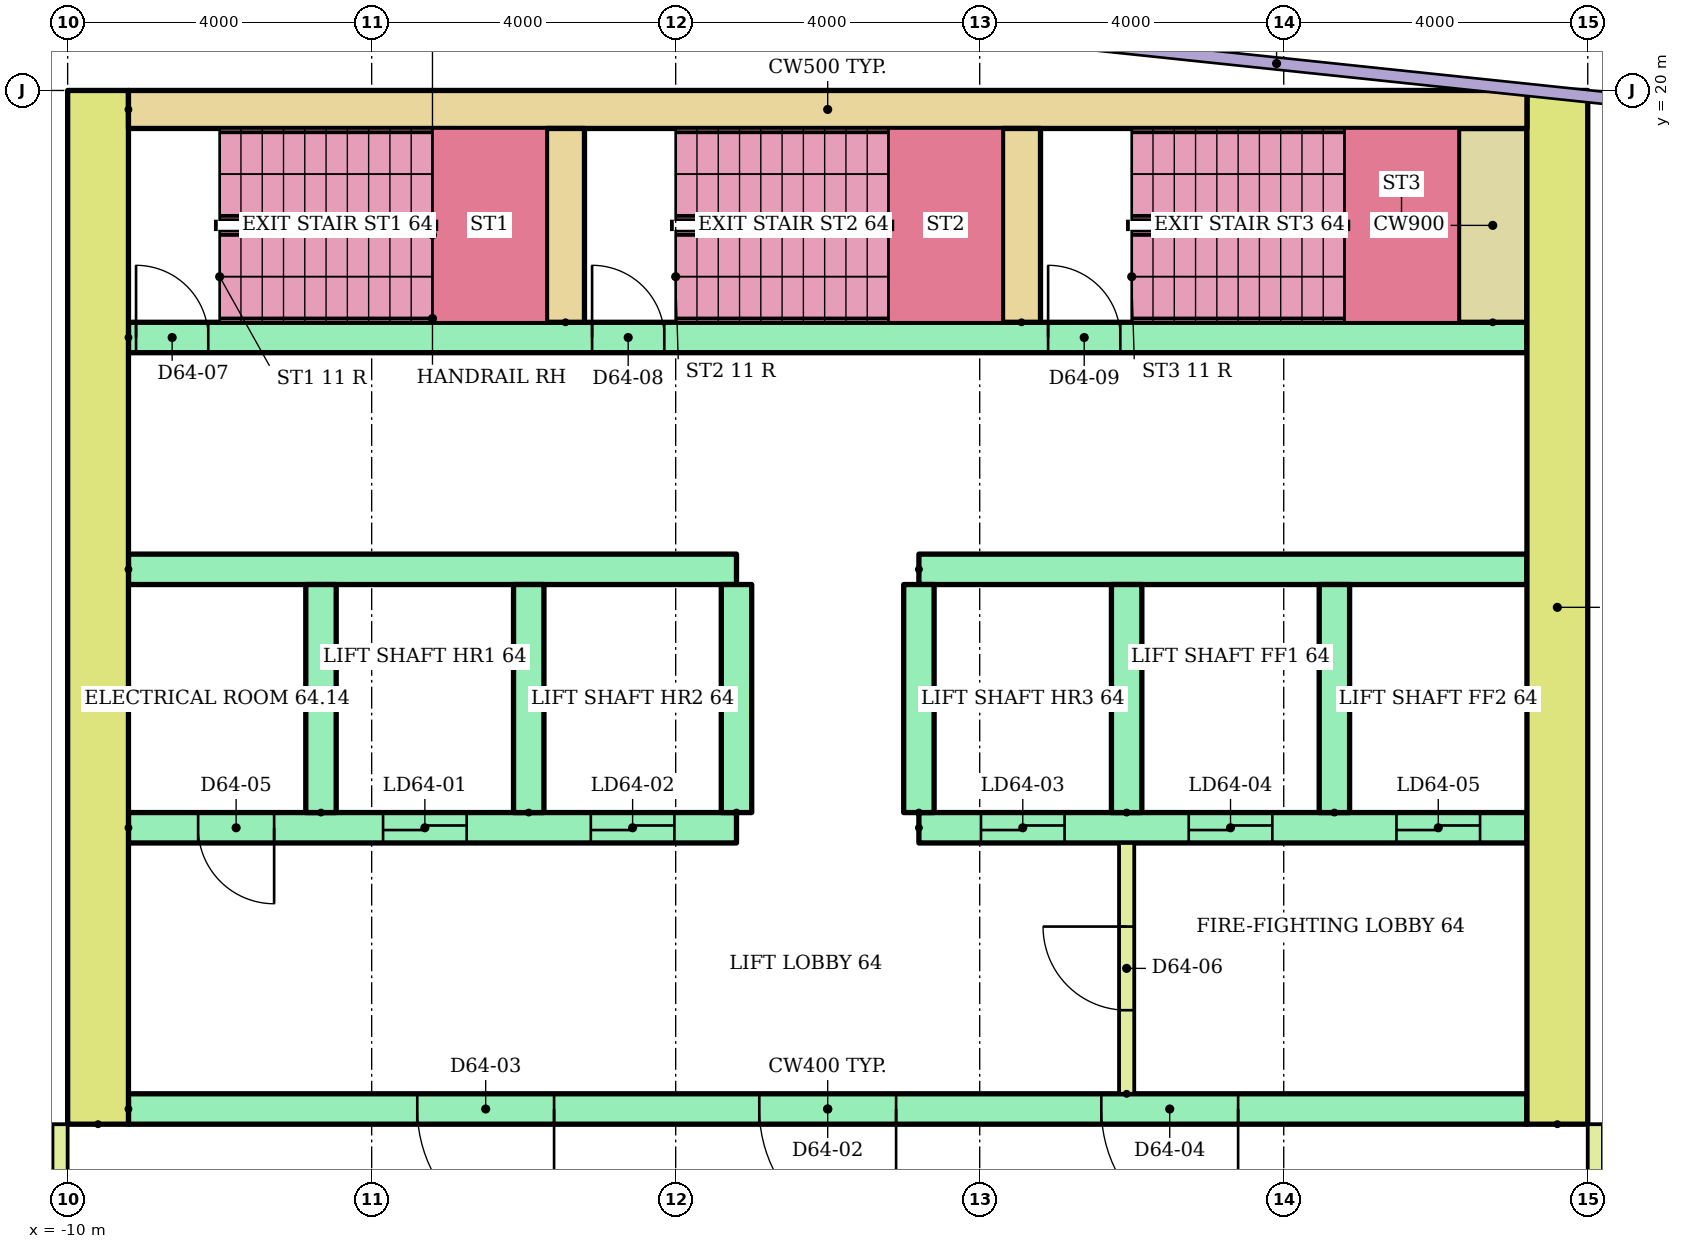
"""IFC4 building model, lengths in metres.
Left out: names, types, materials, properties, quantities, classifications, styles, units other than length and angle.
Written with IfcOpenShell. Run it as: python <this file> out.ifc"""

import sys

from ifc_helpers import new_model, si_unit, direction, frame, frame_2d, origin, place, context, subcontext, project, spatial, rectangle, extrude, element, fill, save


model = new_model("IFC4")
c1 = context("Model", 3, precision=1e-05, world=origin(), true_north=direction((0.0, 1.0)))
c2 = subcontext(c1, "Body", "Model", "MODEL_VIEW")
j1 = project(units=[si_unit("LENGTHUNIT", "METRE"), si_unit("PLANEANGLEUNIT", "RADIAN")], contexts=[c1])
p1 = place(None, origin())
s1 = spatial("IfcSite", under=j1, at=p1, CompositionType="ELEMENT")
p2 = place(p1, origin())
s2 = spatial("IfcBuilding", under=s1, at=p2, CompositionType="ELEMENT")
p3 = place(p2, frame((0.0, 0.0, 249.2)))
s3 = spatial("IfcBuildingStorey", under=s2, at=p3, CompositionType="ELEMENT", Elevation=249.2)
for number, where, z_axis, x_axis in (
    (1, (-9.6, 6.4, 0.0), (0.0, 0.0, 1.0), (0.0, 1.0, 0.0)),
    (2, (9.6, 6.4, 0.0), (0.0, 0.0, 1.0), (0.0, 1.0, 0.0)),
):
    element("IfcWall", number, at=place(p3, frame(where, z_axis=z_axis, x_axis=x_axis)), inside=s3, PredefinedType="SHEAR", context=c2, shape_type="SweptSolid", body=[
        extrude(rectangle(XDim=13.6, YDim=0.8, at=frame_2d((6.8, 0.0))), origin(), (0.0, 0.0, 1.0), 3.62),
    ])
p4 = place(p3, frame((-9.2, 19.75, 0.0)))
e3 = element("IfcWall", 3, at=p4, inside=s3, PredefinedType="SHEAR", context=c2, shape_type="SweptSolid", body=[
    extrude(rectangle(XDim=18.4, YDim=0.5, at=frame_2d((9.2, 0.0))), origin(), (0.0, 0.0, 1.0), 3.62),
])
p5 = place(p3, frame((-9.2, 6.6, 0.0)))
e4 = element("IfcWall", 4, at=p5, inside=s3, PredefinedType="SHEAR", context=c2, shape_type="SweptSolid", body=[
    extrude(rectangle(XDim=18.4, YDim=0.4, at=frame_2d((9.2, 0.0))), origin(), (0.0, 0.0, 1.0), 3.62),
])
p6 = place(p5, frame((8.3, 0.0, 0.0)))
e5 = element("IfcOpeningElement", 5, at=p6, cuts=e4, PredefinedType="OPENING", context=c2, shape_type="SweptSolid", body=[
    extrude(rectangle(XDim=1.8, YDim=2.1, at=frame_2d((0.9, 1.05))), frame((0.0, 0.21, 0.0), z_axis=(0.0, -1.0, 0.0), x_axis=(1.0, 0.0, 0.0)), (0.0, 0.0, 1.0), 0.42),
])
p7 = place(p5, frame((3.8, 0.0, 0.0)))
e6 = element("IfcOpeningElement", 6, at=p7, cuts=e4, PredefinedType="OPENING", context=c2, shape_type="SweptSolid", body=[
    extrude(rectangle(XDim=1.8, YDim=2.1, at=frame_2d((0.9, 1.05))), frame((0.0, 0.21, 0.0), z_axis=(0.0, -1.0, 0.0), x_axis=(1.0, 0.0, 0.0)), (0.0, 0.0, 1.0), 0.42),
])
p8 = place(p5, frame((12.8, 0.0, 0.0)))
e7 = element("IfcOpeningElement", 7, at=p8, cuts=e4, PredefinedType="OPENING", context=c2, shape_type="SweptSolid", body=[
    extrude(rectangle(XDim=1.8, YDim=2.1, at=frame_2d((0.9, 1.05))), frame((0.0, 0.21, 0.0), z_axis=(0.0, -1.0, 0.0), x_axis=(1.0, 0.0, 0.0)), (0.0, 0.0, 1.0), 0.42),
])
p9 = place(p3, frame((-9.2, 10.3, 0.0)))
e8 = element("IfcWall", 8, at=p9, inside=s3, PredefinedType="SHEAR", context=c2, shape_type="SweptSolid", body=[
    extrude(rectangle(XDim=8.0, YDim=0.4, at=frame_2d((4.0, 0.0))), origin(), (0.0, 0.0, 1.0), 3.62),
])
p10 = place(p9, frame((3.35, 0.0, 0.0)))
e9 = element("IfcOpeningElement", 9, at=p10, cuts=e8, PredefinedType="OPENING", context=c2, shape_type="SweptSolid", body=[
    extrude(rectangle(XDim=1.1, YDim=2.1, at=frame_2d((0.55, 1.05))), frame((0.0, 0.21, 0.0), z_axis=(0.0, -1.0, 0.0), x_axis=(1.0, 0.0, 0.0)), (0.0, 0.0, 1.0), 0.42),
])
p11 = place(p9, frame((6.083, 0.0, 0.0)))
e10 = element("IfcOpeningElement", 10, at=p11, cuts=e8, PredefinedType="OPENING", context=c2, shape_type="SweptSolid", body=[
    extrude(rectangle(XDim=1.1, YDim=2.1, at=frame_2d((0.55, 1.05))), frame((0.0, 0.21, 0.0), z_axis=(0.0, -1.0, 0.0), x_axis=(1.0, 0.0, 0.0)), (0.0, 0.0, 1.0), 0.42),
])
p12 = place(p9, frame((0.917, 0.0, 0.0)))
e11 = element("IfcOpeningElement", 11, at=p12, cuts=e8, PredefinedType="OPENING", context=c2, shape_type="SweptSolid", body=[
    extrude(rectangle(XDim=1.0, YDim=2.1, at=frame_2d((0.5, 1.05))), frame((0.0, 0.21, 0.0), z_axis=(0.0, -1.0, 0.0), x_axis=(1.0, 0.0, 0.0)), (0.0, 0.0, 1.0), 0.42),
])
p13 = place(p3, frame((-9.2, 13.7, 0.0)))
e12 = element("IfcWall", 12, at=p13, inside=s3, PredefinedType="SHEAR", context=c2, shape_type="SweptSolid", body=[
    extrude(rectangle(XDim=8.0, YDim=0.4, at=frame_2d((4.0, 0.0))), origin(), (0.0, 0.0, 1.0), 3.62),
])
p14 = place(p3, frame((1.2, 10.3, 0.0)))
e13 = element("IfcWall", 13, at=p14, inside=s3, PredefinedType="SHEAR", context=c2, shape_type="SweptSolid", body=[
    extrude(rectangle(XDim=8.0, YDim=0.4, at=frame_2d((4.0, 0.0))), origin(), (0.0, 0.0, 1.0), 3.62),
])
p15 = place(p14, frame((0.817, 0.0, 0.0)))
e14 = element("IfcOpeningElement", 14, at=p15, cuts=e13, PredefinedType="OPENING", context=c2, shape_type="SweptSolid", body=[
    extrude(rectangle(XDim=1.1, YDim=2.1, at=frame_2d((0.55, 1.05))), frame((0.0, 0.21, 0.0), z_axis=(0.0, -1.0, 0.0), x_axis=(1.0, 0.0, 0.0)), (0.0, 0.0, 1.0), 0.42),
])
p16 = place(p14, frame((3.55, 0.0, 0.0)))
e15 = element("IfcOpeningElement", 15, at=p16, cuts=e13, PredefinedType="OPENING", context=c2, shape_type="SweptSolid", body=[
    extrude(rectangle(XDim=1.1, YDim=2.1, at=frame_2d((0.55, 1.05))), frame((0.0, 0.21, 0.0), z_axis=(0.0, -1.0, 0.0), x_axis=(1.0, 0.0, 0.0)), (0.0, 0.0, 1.0), 0.42),
])
p17 = place(p14, frame((6.283, 0.0, 0.0)))
e16 = element("IfcOpeningElement", 16, at=p17, cuts=e13, PredefinedType="OPENING", context=c2, shape_type="SweptSolid", body=[
    extrude(rectangle(XDim=1.1, YDim=2.1, at=frame_2d((0.55, 1.05))), frame((0.0, 0.21, 0.0), z_axis=(0.0, -1.0, 0.0), x_axis=(1.0, 0.0, 0.0)), (0.0, 0.0, 1.0), 0.42),
])
p18 = place(p3, frame((1.2, 13.7, 0.0)))
e17 = element("IfcWall", 17, at=p18, inside=s3, PredefinedType="SHEAR", context=c2, shape_type="SweptSolid", body=[
    extrude(rectangle(XDim=8.0, YDim=0.4, at=frame_2d((4.0, 0.0))), origin(), (0.0, 0.0, 1.0), 3.62),
])
for number, where, z_axis, x_axis in (
    (18, (-6.667, 10.5, 0.0), (0.0, 0.0, 1.0), (0.0, 1.0, 0.0)),
    (19, (-3.933, 10.5, 0.0), (0.0, 0.0, 1.0), (0.0, 1.0, 0.0)),
    (20, (-1.2, 10.5, 0.0), (0.0, 0.0, 1.0), (0.0, 1.0, 0.0)),
    (21, (1.2, 10.5, 0.0), (0.0, 0.0, 1.0), (0.0, 1.0, 0.0)),
    (22, (3.933, 10.5, 0.0), (0.0, 0.0, 1.0), (0.0, 1.0, 0.0)),
    (23, (6.667, 10.5, 0.0), (0.0, 0.0, 1.0), (0.0, 1.0, 0.0)),
):
    element("IfcWall", number, at=place(p3, frame(where, z_axis=z_axis, x_axis=x_axis)), inside=s3, PredefinedType="SHEAR", context=c2, shape_type="SweptSolid", body=[
        extrude(rectangle(XDim=3.0, YDim=0.4, at=frame_2d((1.5, 0.0))), origin(), (0.0, 0.0, 1.0), 3.62),
    ])
p19 = place(p3, frame((3.933, 6.8, 0.0), z_axis=(0.0, 0.0, 1.0), x_axis=(0.0, 1.0, 0.0)))
e24 = element("IfcWall", 24, at=p19, inside=s3, PredefinedType="PARTITIONING", context=c2, shape_type="SweptSolid", body=[
    extrude(rectangle(XDim=3.3, YDim=0.2, at=frame_2d((1.65, 0.0))), origin(), (0.0, 0.0, 1.0), 3.62),
])
p20 = place(p19, frame((1.1, 0.0, 0.0)))
e25 = element("IfcOpeningElement", 25, at=p20, cuts=e24, PredefinedType="OPENING", context=c2, shape_type="SweptSolid", body=[
    extrude(rectangle(XDim=1.1, YDim=2.1, at=frame_2d((0.55, 1.05))), frame((0.0, 0.11, 0.0), z_axis=(0.0, -1.0, 0.0), x_axis=(1.0, 0.0, 0.0)), (0.0, 0.0, 1.0), 0.22),
])
p21 = place(p3, frame((-9.2, 16.75, 0.0)))
e26 = element("IfcWall", 26, at=p21, inside=s3, PredefinedType="SHEAR", context=c2, shape_type="SweptSolid", body=[
    extrude(rectangle(XDim=18.4, YDim=0.4, at=frame_2d((9.2, 0.0))), origin(), (0.0, 0.0, 1.0), 3.62),
])
p22 = place(p21, frame((0.1, 0.0, 0.0)))
e27 = element("IfcOpeningElement", 27, at=p22, cuts=e26, PredefinedType="OPENING", context=c2, shape_type="SweptSolid", body=[
    extrude(rectangle(XDim=0.95, YDim=2.1, at=frame_2d((0.475, 1.05))), frame((0.0, 0.21, 0.0), z_axis=(0.0, -1.0, 0.0), x_axis=(1.0, 0.0, 0.0)), (0.0, 0.0, 1.0), 0.42),
])
p23 = place(p21, frame((6.1, 0.0, 0.0)))
e28 = element("IfcOpeningElement", 28, at=p23, cuts=e26, PredefinedType="OPENING", context=c2, shape_type="SweptSolid", body=[
    extrude(rectangle(XDim=0.95, YDim=2.1, at=frame_2d((0.475, 1.05))), frame((0.0, 0.21, 0.0), z_axis=(0.0, -1.0, 0.0), x_axis=(1.0, 0.0, 0.0)), (0.0, 0.0, 1.0), 0.42),
])
p24 = place(p21, frame((12.1, 0.0, 0.0)))
e29 = element("IfcOpeningElement", 29, at=p24, cuts=e26, PredefinedType="OPENING", context=c2, shape_type="SweptSolid", body=[
    extrude(rectangle(XDim=0.95, YDim=2.1, at=frame_2d((0.475, 1.05))), frame((0.0, 0.21, 0.0), z_axis=(0.0, -1.0, 0.0), x_axis=(1.0, 0.0, 0.0)), (0.0, 0.0, 1.0), 0.42),
])
for number, where, z_axis, x_axis in (
    (30, (-3.45, 16.95, 0.0), (0.0, 0.0, 1.0), (0.0, 1.0, 0.0)),
    (31, (2.55, 16.95, 0.0), (0.0, 0.0, 1.0), (0.0, 1.0, 0.0)),
):
    element("IfcWall", number, at=place(p3, frame(where, z_axis=z_axis, x_axis=x_axis)), inside=s3, PredefinedType="SHEAR", context=c2, shape_type="SweptSolid", body=[
        extrude(rectangle(XDim=2.55, YDim=0.5, at=frame_2d((1.275, 0.0))), origin(), (0.0, 0.0, 1.0), 3.62),
    ])
p25 = place(p3, frame((8.75, 16.95, 0.0), z_axis=(0.0, 0.0, 1.0), x_axis=(0.0, 1.0, 0.0)))
e32 = element("IfcWall", 32, at=p25, inside=s3, PredefinedType="SHEAR", context=c2, shape_type="SweptSolid", body=[
    extrude(rectangle(XDim=2.55, YDim=0.9, at=frame_2d((1.275, 0.0))), origin(), (0.0, 0.0, 1.0), 3.62),
])
for number, where, z_axis, x_axis in (
    (33, (-10.1, 1.5, 0.0), (0.0, 0.0, 1.0), (0.0, 1.0, 0.0)),
    (34, (10.1, 1.5, 0.0), (0.0, 0.0, 1.0), (0.0, 1.0, 0.0)),
):
    element("IfcWall", number, at=place(p3, frame(where, z_axis=z_axis, x_axis=x_axis)), inside=s3, PredefinedType="PARTITIONING", context=c2, shape_type="SweptSolid", body=[
        extrude(rectangle(XDim=4.9, YDim=0.2, at=frame_2d((2.45, 0.0))), origin(), (0.0, 0.0, 1.0), 3.62),
    ])
p26 = place(p6, frame((1.8, 0.0, 0.0), z_axis=(0.0, 0.0, 1.0), x_axis=(-1.0, 0.0, 0.0)))
e35 = element("IfcDoor", 35, at=p26, inside=s3, OperationType="DOUBLE_DOOR_SINGLE_SWING", PredefinedType="DOOR", context=c2, shape_type="SweptSolid", body=[
    extrude(rectangle(XDim=1.8, YDim=2.1, at=frame_2d((0.9, 1.05))), frame((0.0, 0.025, 0.0), z_axis=(0.0, -1.0, 0.0), x_axis=(1.0, 0.0, 0.0)), (0.0, 0.0, 1.0), 0.05),
])
fill(e5, e35)
p27 = place(p7, frame((1.8, 0.0, 0.0), z_axis=(0.0, 0.0, 1.0), x_axis=(-1.0, 0.0, 0.0)))
e36 = element("IfcDoor", 36, at=p27, inside=s3, OperationType="DOUBLE_DOOR_SINGLE_SWING", PredefinedType="DOOR", context=c2, shape_type="SweptSolid", body=[
    extrude(rectangle(XDim=1.8, YDim=2.1, at=frame_2d((0.9, 1.05))), frame((0.0, 0.025, 0.0), z_axis=(0.0, -1.0, 0.0), x_axis=(1.0, 0.0, 0.0)), (0.0, 0.0, 1.0), 0.05),
])
fill(e6, e36)
p28 = place(p8, frame((1.8, 0.0, 0.0), z_axis=(0.0, 0.0, 1.0), x_axis=(-1.0, 0.0, 0.0)))
e37 = element("IfcDoor", 37, at=p28, inside=s3, OperationType="DOUBLE_DOOR_SINGLE_SWING", PredefinedType="DOOR", context=c2, shape_type="SweptSolid", body=[
    extrude(rectangle(XDim=1.8, YDim=2.1, at=frame_2d((0.9, 1.05))), frame((0.0, 0.025, 0.0), z_axis=(0.0, -1.0, 0.0), x_axis=(1.0, 0.0, 0.0)), (0.0, 0.0, 1.0), 0.05),
])
fill(e7, e37)
p29 = place(p10, origin())
e38 = element("IfcDoor", 38, at=p29, inside=s3, OperationType="SLIDING_TO_LEFT", PredefinedType="DOOR", context=c2, shape_type="SweptSolid", body=[
    extrude(rectangle(XDim=1.1, YDim=2.1, at=frame_2d((0.55, 1.05))), frame((0.0, 0.025, 0.0), z_axis=(0.0, -1.0, 0.0), x_axis=(1.0, 0.0, 0.0)), (0.0, 0.0, 1.0), 0.05),
])
fill(e9, e38)
p30 = place(p11, origin())
e39 = element("IfcDoor", 39, at=p30, inside=s3, OperationType="SLIDING_TO_LEFT", PredefinedType="DOOR", context=c2, shape_type="SweptSolid", body=[
    extrude(rectangle(XDim=1.1, YDim=2.1, at=frame_2d((0.55, 1.05))), frame((0.0, 0.025, 0.0), z_axis=(0.0, -1.0, 0.0), x_axis=(1.0, 0.0, 0.0)), (0.0, 0.0, 1.0), 0.05),
])
fill(e10, e39)
p31 = place(p15, origin())
e40 = element("IfcDoor", 40, at=p31, inside=s3, OperationType="SLIDING_TO_LEFT", PredefinedType="DOOR", context=c2, shape_type="SweptSolid", body=[
    extrude(rectangle(XDim=1.1, YDim=2.1, at=frame_2d((0.55, 1.05))), frame((0.0, 0.025, 0.0), z_axis=(0.0, -1.0, 0.0), x_axis=(1.0, 0.0, 0.0)), (0.0, 0.0, 1.0), 0.05),
])
fill(e14, e40)
p32 = place(p16, origin())
e41 = element("IfcDoor", 41, at=p32, inside=s3, OperationType="SLIDING_TO_LEFT", PredefinedType="DOOR", context=c2, shape_type="SweptSolid", body=[
    extrude(rectangle(XDim=1.1, YDim=2.1, at=frame_2d((0.55, 1.05))), frame((0.0, 0.025, 0.0), z_axis=(0.0, -1.0, 0.0), x_axis=(1.0, 0.0, 0.0)), (0.0, 0.0, 1.0), 0.05),
])
fill(e15, e41)
p33 = place(p17, origin())
e42 = element("IfcDoor", 42, at=p33, inside=s3, OperationType="SLIDING_TO_LEFT", PredefinedType="DOOR", context=c2, shape_type="SweptSolid", body=[
    extrude(rectangle(XDim=1.1, YDim=2.1, at=frame_2d((0.55, 1.05))), frame((0.0, 0.025, 0.0), z_axis=(0.0, -1.0, 0.0), x_axis=(1.0, 0.0, 0.0)), (0.0, 0.0, 1.0), 0.05),
])
fill(e16, e42)
p34 = place(p12, frame((1.0, 0.0, 0.0), z_axis=(0.0, 0.0, 1.0), x_axis=(-1.0, 0.0, 0.0)))
e43 = element("IfcDoor", 43, at=p34, inside=s3, OperationType="SINGLE_SWING_RIGHT", PredefinedType="DOOR", context=c2, shape_type="SweptSolid", body=[
    extrude(rectangle(XDim=1.0, YDim=2.1, at=frame_2d((0.5, 1.05))), frame((0.0, 0.025, 0.0), z_axis=(0.0, -1.0, 0.0), x_axis=(1.0, 0.0, 0.0)), (0.0, 0.0, 1.0), 0.05),
])
fill(e11, e43)
p35 = place(p20, origin())
e44 = element("IfcDoor", 44, at=p35, inside=s3, OperationType="SINGLE_SWING_RIGHT", PredefinedType="DOOR", context=c2, shape_type="SweptSolid", body=[
    extrude(rectangle(XDim=1.1, YDim=2.1, at=frame_2d((0.55, 1.05))), frame((0.0, 0.025, 0.0), z_axis=(0.0, -1.0, 0.0), x_axis=(1.0, 0.0, 0.0)), (0.0, 0.0, 1.0), 0.05),
])
fill(e25, e44)
p36 = place(p22, origin())
e45 = element("IfcDoor", 45, at=p36, inside=s3, OperationType="SINGLE_SWING_LEFT", PredefinedType="DOOR", context=c2, shape_type="SweptSolid", body=[
    extrude(rectangle(XDim=0.95, YDim=2.1, at=frame_2d((0.475, 1.05))), frame((0.0, 0.025, 0.0), z_axis=(0.0, -1.0, 0.0), x_axis=(1.0, 0.0, 0.0)), (0.0, 0.0, 1.0), 0.05),
])
fill(e27, e45)
p37 = place(p23, origin())
e46 = element("IfcDoor", 46, at=p37, inside=s3, OperationType="SINGLE_SWING_LEFT", PredefinedType="DOOR", context=c2, shape_type="SweptSolid", body=[
    extrude(rectangle(XDim=0.95, YDim=2.1, at=frame_2d((0.475, 1.05))), frame((0.0, 0.025, 0.0), z_axis=(0.0, -1.0, 0.0), x_axis=(1.0, 0.0, 0.0)), (0.0, 0.0, 1.0), 0.05),
])
fill(e28, e46)
p38 = place(p24, origin())
e47 = element("IfcDoor", 47, at=p38, inside=s3, OperationType="SINGLE_SWING_LEFT", PredefinedType="DOOR", context=c2, shape_type="SweptSolid", body=[
    extrude(rectangle(XDim=0.95, YDim=2.1, at=frame_2d((0.475, 1.05))), frame((0.0, 0.025, 0.0), z_axis=(0.0, -1.0, 0.0), x_axis=(1.0, 0.0, 0.0)), (0.0, 0.0, 1.0), 0.05),
])
fill(e29, e47)
save(model, sys.argv[1])
